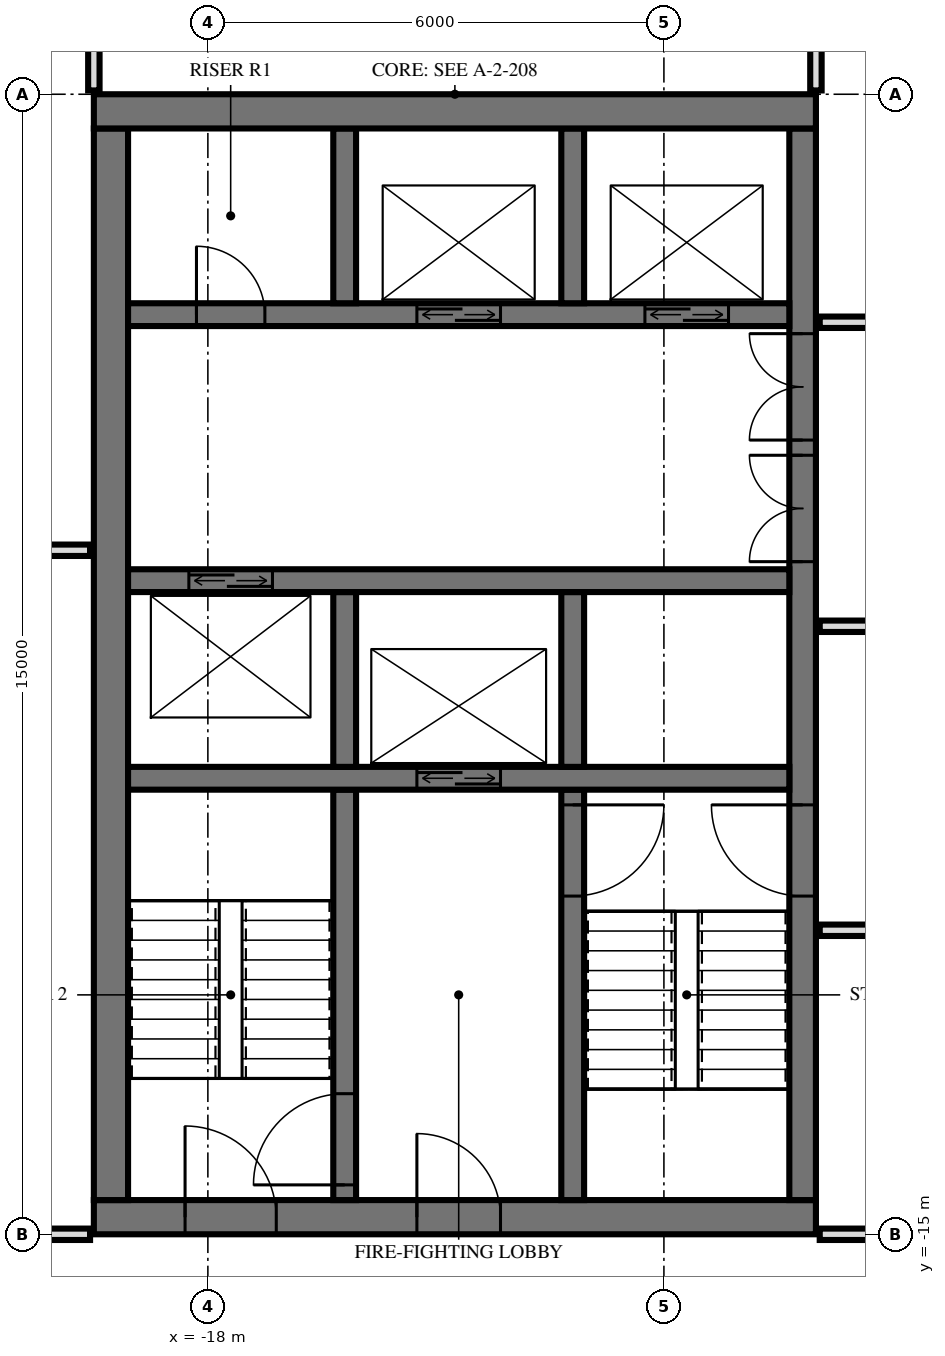
"""IFC4 building model, lengths in metres.
Left out: names, types, materials, properties, quantities, classifications, styles, units other than length and angle.
Written with IfcOpenShell. Run it as: python <this file> out.ifc"""

import sys

from ifc_helpers import new_model, si_unit, direction, frame, frame_2d, origin, place, context, subcontext, project, spatial, rectangle, extrude, element, fill, save


model = new_model("IFC4")
c1 = context("Model", 3, precision=1e-05, world=origin(), true_north=direction((0.0, 1.0)))
c2 = subcontext(c1, "Body", "Model", "MODEL_VIEW")
j1 = project(units=[si_unit("LENGTHUNIT", "METRE"), si_unit("PLANEANGLEUNIT", "RADIAN")], contexts=[c1])
p1 = place(None, origin())
s1 = spatial("IfcSite", under=j1, at=p1, CompositionType="ELEMENT")
p2 = place(p1, origin())
s2 = spatial("IfcBuilding", under=s1, at=p2, CompositionType="ELEMENT")
p3 = place(p2, frame((0.0, 0.0, 277.1)))
s3 = spatial("IfcBuildingStorey", under=s2, at=p3, CompositionType="ELEMENT", Elevation=277.1)
p4 = place(p3, frame((-19.5, -0.225, 0.0), z_axis=(0.0, 0.0, 1.0), x_axis=(1.0, 0.0, 0.0)))
e1 = element("IfcWall", 1, at=p4, inside=s3, PredefinedType="SHEAR", context=c2, shape_type="SweptSolid", body=[
    extrude(rectangle(XDim=9.5, YDim=0.45, at=frame_2d((4.75, 0.0))), origin(), (0.0, 0.0, 1.0), 3.5),
])
p5 = place(p3, frame((-19.5, -14.775, 0.0), z_axis=(0.0, 0.0, 1.0), x_axis=(1.0, 0.0, 0.0)))
e2 = element("IfcWall", 2, at=p5, inside=s3, PredefinedType="SHEAR", context=c2, shape_type="SweptSolid", body=[
    extrude(rectangle(XDim=9.5, YDim=0.45, at=frame_2d((4.75, 0.0))), origin(), (0.0, 0.0, 1.0), 3.5),
])
p6 = place(p5, frame((1.2, 0.0, 0.0)))
e3 = element("IfcOpeningElement", 3, at=p6, cuts=e2, PredefinedType="OPENING", context=c2, shape_type="SweptSolid", body=[
    extrude(rectangle(XDim=1.2, YDim=2.1, at=frame_2d((0.6, 1.05))), frame((0.0, 0.235, 0.0), z_axis=(0.0, -1.0, 0.0), x_axis=(1.0, 0.0, 0.0)), (0.0, 0.0, 1.0), 0.47),
])
p7 = place(p5, frame((4.25, 0.0, 0.0)))
e4 = element("IfcOpeningElement", 4, at=p7, cuts=e2, PredefinedType="OPENING", context=c2, shape_type="SweptSolid", body=[
    extrude(rectangle(XDim=1.1, YDim=2.1, at=frame_2d((0.55, 1.05))), frame((0.0, 0.235, 0.0), z_axis=(0.0, -1.0, 0.0), x_axis=(1.0, 0.0, 0.0)), (0.0, 0.0, 1.0), 0.47),
])
p8 = place(p3, frame((-10.175, -14.55, 0.0), z_axis=(0.0, 0.0, 1.0), x_axis=(0.0, 1.0, 0.0)))
e5 = element("IfcWall", 5, at=p8, inside=s3, PredefinedType="SHEAR", context=c2, shape_type="SweptSolid", body=[
    extrude(rectangle(XDim=14.1, YDim=0.35, at=frame_2d((7.05, 0.0))), origin(), (0.0, 0.0, 1.0), 3.5),
])
p9 = place(p8, frame((8.4, 0.0, 0.0)))
e6 = element("IfcOpeningElement", 6, at=p9, cuts=e5, PredefinedType="OPENING", context=c2, shape_type="SweptSolid", body=[
    extrude(rectangle(XDim=1.4, YDim=2.4, at=frame_2d((0.7, 1.2))), frame((0.0, 0.185, 0.0), z_axis=(0.0, -1.0, 0.0), x_axis=(1.0, 0.0, 0.0)), (0.0, 0.0, 1.0), 0.37),
])
p10 = place(p8, frame((10.0, 0.0, 0.0)))
e7 = element("IfcOpeningElement", 7, at=p10, cuts=e5, PredefinedType="OPENING", context=c2, shape_type="SweptSolid", body=[
    extrude(rectangle(XDim=1.4, YDim=2.4, at=frame_2d((0.7, 1.2))), frame((0.0, 0.185, 0.0), z_axis=(0.0, -1.0, 0.0), x_axis=(1.0, 0.0, 0.0)), (0.0, 0.0, 1.0), 0.37),
])
p11 = place(p8, frame((4.0, 0.0, 0.0)))
e8 = element("IfcOpeningElement", 8, at=p11, cuts=e5, PredefinedType="OPENING", context=c2, shape_type="SweptSolid", body=[
    extrude(rectangle(XDim=1.2, YDim=2.1, at=frame_2d((0.6, 1.05))), frame((0.0, 0.185, 0.0), z_axis=(0.0, -1.0, 0.0), x_axis=(1.0, 0.0, 0.0)), (0.0, 0.0, 1.0), 0.37),
])
p12 = place(p3, frame((-19.275, -14.55, 0.0), z_axis=(0.0, 0.0, 1.0), x_axis=(0.0, 1.0, 0.0)))
e9 = element("IfcWall", 9, at=p12, inside=s3, PredefinedType="SHEAR", context=c2, shape_type="SweptSolid", body=[
    extrude(rectangle(XDim=14.1, YDim=0.45, at=frame_2d((7.05, 0.0))), origin(), (0.0, 0.0, 1.0), 3.5),
])
p13 = place(p3, frame((-19.05, -2.9, 0.0), z_axis=(0.0, 0.0, 1.0), x_axis=(1.0, 0.0, 0.0)))
e10 = element("IfcWall", 10, at=p13, inside=s3, PredefinedType="SHEAR", context=c2, shape_type="SweptSolid", body=[
    extrude(rectangle(XDim=8.7, YDim=0.3, at=frame_2d((4.35, 0.0))), origin(), (0.0, 0.0, 1.0), 3.5),
])
p14 = place(p13, frame((6.8, 0.0, 0.0)))
e11 = element("IfcOpeningElement", 11, at=p14, cuts=e10, PredefinedType="OPENING", context=c2, shape_type="SweptSolid", body=[
    extrude(rectangle(XDim=1.1, YDim=2.1, at=frame_2d((0.55, 1.05))), frame((0.0, 0.16, 0.0), z_axis=(0.0, -1.0, 0.0), x_axis=(1.0, 0.0, 0.0)), (0.0, 0.0, 1.0), 0.32),
])
p15 = place(p13, frame((3.8, 0.0, 0.0)))
e12 = element("IfcOpeningElement", 12, at=p15, cuts=e10, PredefinedType="OPENING", context=c2, shape_type="SweptSolid", body=[
    extrude(rectangle(XDim=1.1, YDim=2.1, at=frame_2d((0.55, 1.05))), frame((0.0, 0.16, 0.0), z_axis=(0.0, -1.0, 0.0), x_axis=(1.0, 0.0, 0.0)), (0.0, 0.0, 1.0), 0.32),
])
p16 = place(p13, frame((0.9, 0.0, 0.0)))
e13 = element("IfcOpeningElement", 13, at=p16, cuts=e10, PredefinedType="OPENING", context=c2, shape_type="SweptSolid", body=[
    extrude(rectangle(XDim=0.9, YDim=2.1, at=frame_2d((0.45, 1.05))), frame((0.0, 0.16, 0.0), z_axis=(0.0, -1.0, 0.0), x_axis=(1.0, 0.0, 0.0)), (0.0, 0.0, 1.0), 0.32),
])
p17 = place(p3, frame((-19.05, -6.4, 0.0), z_axis=(0.0, 0.0, 1.0), x_axis=(1.0, 0.0, 0.0)))
e14 = element("IfcWall", 14, at=p17, inside=s3, PredefinedType="SHEAR", context=c2, shape_type="SweptSolid", body=[
    extrude(rectangle(XDim=8.7, YDim=0.3, at=frame_2d((4.35, 0.0))), origin(), (0.0, 0.0, 1.0), 3.5),
])
p18 = place(p17, frame((0.8, 0.0, 0.0)))
e15 = element("IfcOpeningElement", 15, at=p18, cuts=e14, PredefinedType="OPENING", context=c2, shape_type="SweptSolid", body=[
    extrude(rectangle(XDim=1.1, YDim=2.1, at=frame_2d((0.55, 1.05))), frame((0.0, 0.16, 0.0), z_axis=(0.0, -1.0, 0.0), x_axis=(1.0, 0.0, 0.0)), (0.0, 0.0, 1.0), 0.32),
])
p19 = place(p3, frame((-19.05, -9.0, 0.0), z_axis=(0.0, 0.0, 1.0), x_axis=(1.0, 0.0, 0.0)))
e16 = element("IfcWall", 16, at=p19, inside=s3, PredefinedType="SHEAR", context=c2, shape_type="SweptSolid", body=[
    extrude(rectangle(XDim=8.7, YDim=0.3, at=frame_2d((4.35, 0.0))), origin(), (0.0, 0.0, 1.0), 3.5),
])
p20 = place(p19, frame((3.8, 0.0, 0.0)))
e17 = element("IfcOpeningElement", 17, at=p20, cuts=e16, PredefinedType="OPENING", context=c2, shape_type="SweptSolid", body=[
    extrude(rectangle(XDim=1.1, YDim=2.1, at=frame_2d((0.55, 1.05))), frame((0.0, 0.16, 0.0), z_axis=(0.0, -1.0, 0.0), x_axis=(1.0, 0.0, 0.0)), (0.0, 0.0, 1.0), 0.32),
])
for number, where, z_axis, x_axis in (
    (18, (-13.2, -2.75, 0.0), (0.0, 0.0, 1.0), (0.0, 1.0, 0.0)),
    (19, (-13.2, -8.85, 0.0), (0.0, 0.0, 1.0), (0.0, 1.0, 0.0)),
):
    element("IfcWall", number, at=place(p3, frame(where, z_axis=z_axis, x_axis=x_axis)), inside=s3, PredefinedType="SHEAR", context=c2, shape_type="SweptSolid", body=[
        extrude(rectangle(XDim=2.3, YDim=0.3, at=frame_2d((1.15, 0.0))), origin(), (0.0, 0.0, 1.0), 3.5),
    ])
p21 = place(p3, frame((-13.2, -14.55, 0.0), z_axis=(0.0, 0.0, 1.0), x_axis=(0.0, 1.0, 0.0)))
e20 = element("IfcWall", 20, at=p21, inside=s3, PredefinedType="SHEAR", context=c2, shape_type="SweptSolid", body=[
    extrude(rectangle(XDim=5.4, YDim=0.3, at=frame_2d((2.7, 0.0))), origin(), (0.0, 0.0, 1.0), 3.5),
])
p22 = place(p21, frame((4.0, 0.0, 0.0)))
e21 = element("IfcOpeningElement", 21, at=p22, cuts=e20, PredefinedType="OPENING", context=c2, shape_type="SweptSolid", body=[
    extrude(rectangle(XDim=1.2, YDim=2.1, at=frame_2d((0.6, 1.05))), frame((0.0, 0.16, 0.0), z_axis=(0.0, -1.0, 0.0), x_axis=(1.0, 0.0, 0.0)), (0.0, 0.0, 1.0), 0.32),
])
for number, where, z_axis, x_axis in (
    (22, (-16.2, -2.75, 0.0), (0.0, 0.0, 1.0), (0.0, 1.0, 0.0)),
    (23, (-16.2, -8.85, 0.0), (0.0, 0.0, 1.0), (0.0, 1.0, 0.0)),
):
    element("IfcWall", number, at=place(p3, frame(where, z_axis=z_axis, x_axis=x_axis)), inside=s3, PredefinedType="SHEAR", context=c2, shape_type="SweptSolid", body=[
        extrude(rectangle(XDim=2.3, YDim=0.3, at=frame_2d((1.15, 0.0))), origin(), (0.0, 0.0, 1.0), 3.5),
    ])
p23 = place(p3, frame((-16.2, -14.55, 0.0), z_axis=(0.0, 0.0, 1.0), x_axis=(0.0, 1.0, 0.0)))
e24 = element("IfcWall", 24, at=p23, inside=s3, PredefinedType="SHEAR", context=c2, shape_type="SweptSolid", body=[
    extrude(rectangle(XDim=5.4, YDim=0.3, at=frame_2d((2.7, 0.0))), origin(), (0.0, 0.0, 1.0), 3.5),
])
p24 = place(p23, frame((0.2, 0.0, 0.0)))
e25 = element("IfcOpeningElement", 25, at=p24, cuts=e24, PredefinedType="OPENING", context=c2, shape_type="SweptSolid", body=[
    extrude(rectangle(XDim=1.2, YDim=2.1, at=frame_2d((0.6, 1.05))), frame((0.0, 0.16, 0.0), z_axis=(0.0, -1.0, 0.0), x_axis=(1.0, 0.0, 0.0)), (0.0, 0.0, 1.0), 0.32),
])
p25 = place(p3, frame((-10.0, 0.05, 0.0), z_axis=(0.0, 0.0, 1.0), x_axis=(0.0, 1.0, 0.0)))
e26 = element("IfcWall", 26, at=p25, inside=s3, PredefinedType="PARTITIONING", context=c2, shape_type="SweptSolid", body=[
    extrude(rectangle(XDim=0.97, YDim=0.15, at=frame_2d((0.485, 0.0))), origin(), (0.0, 0.0, 1.0), 3.22),
])
p26 = place(p3, frame((-19.5, 0.05, 0.0), z_axis=(0.0, 0.0, 1.0), x_axis=(0.0, 1.0, 0.0)))
e27 = element("IfcWall", 27, at=p26, inside=s3, PredefinedType="PARTITIONING", context=c2, shape_type="SweptSolid", body=[
    extrude(rectangle(XDim=0.787, YDim=0.15, at=frame_2d((0.394, 0.0))), origin(), (0.0, 0.0, 1.0), 3.22),
])
p27 = place(p3, frame((-22.92, -15.0, 0.0), z_axis=(0.0, 0.0, 1.0), x_axis=(1.0, 0.0, 0.0)))
e28 = element("IfcWall", 28, at=p27, inside=s3, PredefinedType="PARTITIONING", context=c2, shape_type="SweptSolid", body=[
    extrude(rectangle(XDim=3.37, YDim=0.15, at=frame_2d((1.685, 0.0))), origin(), (0.0, 0.0, 1.0), 3.22),
])
p28 = place(p27, frame((1.47, 0.0, 0.0)))
e29 = element("IfcOpeningElement", 29, at=p28, cuts=e28, PredefinedType="OPENING", context=c2, shape_type="SweptSolid", body=[
    extrude(rectangle(XDim=1.0, YDim=2.1, at=frame_2d((0.5, 1.05))), frame((0.0, 0.085, 0.0), z_axis=(0.0, -1.0, 0.0), x_axis=(1.0, 0.0, 0.0)), (0.0, 0.0, 1.0), 0.17),
])
p29 = place(p3, frame((-9.95, -15.0, 0.0), z_axis=(0.0, 0.0, 1.0), x_axis=(1.0, 0.0, 0.0)))
e30 = element("IfcWall", 30, at=p29, inside=s3, PredefinedType="PARTITIONING", context=c2, shape_type="SweptSolid", body=[
    extrude(rectangle(XDim=19.9, YDim=0.15, at=frame_2d((9.95, 0.0))), origin(), (0.0, 0.0, 1.0), 2.584),
])
p30 = place(p29, frame((9.45, 0.0, 0.0)))
e31 = element("IfcOpeningElement", 31, at=p30, cuts=e30, PredefinedType="OPENING", context=c2, shape_type="SweptSolid", body=[
    extrude(rectangle(XDim=1.0, YDim=2.1, at=frame_2d((0.5, 1.05))), frame((0.0, 0.085, 0.0), z_axis=(0.0, -1.0, 0.0), x_axis=(1.0, 0.0, 0.0)), (0.0, 0.0, 1.0), 0.17),
])
p31 = place(p3, frame((-9.95, -11.0, 0.0), z_axis=(0.0, 0.0, 1.0), x_axis=(1.0, 0.0, 0.0)))
e32 = element("IfcWall", 32, at=p31, inside=s3, PredefinedType="PARTITIONING", context=c2, shape_type="SweptSolid", body=[
    extrude(rectangle(XDim=19.9, YDim=0.15, at=frame_2d((9.95, 0.0))), origin(), (0.0, 0.0, 1.0), 3.22),
])
p32 = place(p31, frame((9.45, 0.0, 0.0)))
e33 = element("IfcOpeningElement", 33, at=p32, cuts=e32, PredefinedType="OPENING", context=c2, shape_type="SweptSolid", body=[
    extrude(rectangle(XDim=1.0, YDim=2.1, at=frame_2d((0.5, 1.05))), frame((0.0, 0.085, 0.0), z_axis=(0.0, -1.0, 0.0), x_axis=(1.0, 0.0, 0.0)), (0.0, 0.0, 1.0), 0.17),
])
p33 = place(p31, frame((15.45, 0.0, 0.0)))
e34 = element("IfcOpeningElement", 34, at=p33, cuts=e32, PredefinedType="OPENING", context=c2, shape_type="SweptSolid", body=[
    extrude(rectangle(XDim=1.0, YDim=2.1, at=frame_2d((0.5, 1.05))), frame((0.0, 0.085, 0.0), z_axis=(0.0, -1.0, 0.0), x_axis=(1.0, 0.0, 0.0)), (0.0, 0.0, 1.0), 0.17),
])
p34 = place(p3, frame((-9.95, -7.0, 0.0), z_axis=(0.0, 0.0, 1.0), x_axis=(1.0, 0.0, 0.0)))
e35 = element("IfcWall", 35, at=p34, inside=s3, PredefinedType="PARTITIONING", context=c2, shape_type="SweptSolid", body=[
    extrude(rectangle(XDim=19.9, YDim=0.15, at=frame_2d((9.95, 0.0))), origin(), (0.0, 0.0, 1.0), 3.22),
])
p35 = place(p34, frame((9.45, 0.0, 0.0)))
e36 = element("IfcOpeningElement", 36, at=p35, cuts=e35, PredefinedType="OPENING", context=c2, shape_type="SweptSolid", body=[
    extrude(rectangle(XDim=1.0, YDim=2.1, at=frame_2d((0.5, 1.05))), frame((0.0, 0.085, 0.0), z_axis=(0.0, -1.0, 0.0), x_axis=(1.0, 0.0, 0.0)), (0.0, 0.0, 1.0), 0.17),
])
p36 = place(p34, frame((3.45, 0.0, 0.0)))
e37 = element("IfcOpeningElement", 37, at=p36, cuts=e35, PredefinedType="OPENING", context=c2, shape_type="SweptSolid", body=[
    extrude(rectangle(XDim=1.0, YDim=2.1, at=frame_2d((0.5, 1.05))), frame((0.0, 0.085, 0.0), z_axis=(0.0, -1.0, 0.0), x_axis=(1.0, 0.0, 0.0)), (0.0, 0.0, 1.0), 0.17),
])
p37 = place(p3, frame((-22.92, -6.0, 0.0), z_axis=(0.0, 0.0, 1.0), x_axis=(1.0, 0.0, 0.0)))
e38 = element("IfcWall", 38, at=p37, inside=s3, PredefinedType="PARTITIONING", context=c2, shape_type="SweptSolid", body=[
    extrude(rectangle(XDim=3.37, YDim=0.15, at=frame_2d((1.685, 0.0))), origin(), (0.0, 0.0, 1.0), 3.22),
])
p38 = place(p37, frame((1.17, 0.0, 0.0)))
e39 = element("IfcOpeningElement", 39, at=p38, cuts=e38, PredefinedType="OPENING", context=c2, shape_type="SweptSolid", body=[
    extrude(rectangle(XDim=0.9, YDim=2.1, at=frame_2d((0.45, 1.05))), frame((0.0, 0.085, 0.0), z_axis=(0.0, -1.0, 0.0), x_axis=(1.0, 0.0, 0.0)), (0.0, 0.0, 1.0), 0.17),
])
p39 = place(p3, frame((-9.95, -3.0, 0.0), z_axis=(0.0, 0.0, 1.0), x_axis=(1.0, 0.0, 0.0)))
e40 = element("IfcWall", 40, at=p39, inside=s3, PredefinedType="PARTITIONING", context=c2, shape_type="SweptSolid", body=[
    extrude(rectangle(XDim=19.9, YDim=0.15, at=frame_2d((9.95, 0.0))), origin(), (0.0, 0.0, 1.0), 3.22),
])
p40 = place(p39, frame((4.2, 0.0, 0.0)))
e41 = element("IfcOpeningElement", 41, at=p40, cuts=e40, PredefinedType="OPENING", context=c2, shape_type="SweptSolid", body=[
    extrude(rectangle(XDim=1.0, YDim=2.1, at=frame_2d((0.5, 1.05))), frame((0.0, 0.085, 0.0), z_axis=(0.0, -1.0, 0.0), x_axis=(1.0, 0.0, 0.0)), (0.0, 0.0, 1.0), 0.17),
])
p41 = place(p39, frame((11.45, 0.0, 0.0)))
e42 = element("IfcOpeningElement", 42, at=p41, cuts=e40, PredefinedType="OPENING", context=c2, shape_type="SweptSolid", body=[
    extrude(rectangle(XDim=1.0, YDim=2.1, at=frame_2d((0.5, 1.05))), frame((0.0, 0.085, 0.0), z_axis=(0.0, -1.0, 0.0), x_axis=(1.0, 0.0, 0.0)), (0.0, 0.0, 1.0), 0.17),
])
p42 = place(p39, frame((15.45, 0.0, 0.0)))
e43 = element("IfcOpeningElement", 43, at=p42, cuts=e40, PredefinedType="OPENING", context=c2, shape_type="SweptSolid", body=[
    extrude(rectangle(XDim=1.0, YDim=2.1, at=frame_2d((0.5, 1.05))), frame((0.0, 0.085, 0.0), z_axis=(0.0, -1.0, 0.0), x_axis=(1.0, 0.0, 0.0)), (0.0, 0.0, 1.0), 0.17),
])
p43 = place(p39, frame((18.2, 0.0, 0.0)))
e44 = element("IfcOpeningElement", 44, at=p43, cuts=e40, PredefinedType="OPENING", context=c2, shape_type="SweptSolid", body=[
    extrude(rectangle(XDim=1.0, YDim=2.1, at=frame_2d((0.5, 1.05))), frame((0.0, 0.085, 0.0), z_axis=(0.0, -1.0, 0.0), x_axis=(1.0, 0.0, 0.0)), (0.0, 0.0, 1.0), 0.17),
])
p44 = place(p14, origin())
e45 = element("IfcDoor", 45, at=p44, inside=s3, OperationType="DOUBLE_DOOR_SLIDING", PredefinedType="USERDEFINED", context=c2, shape_type="SweptSolid", body=[
    extrude(rectangle(XDim=1.1, YDim=2.1, at=frame_2d((0.55, 1.05))), frame((0.0, 0.025, 0.0), z_axis=(0.0, -1.0, 0.0), x_axis=(1.0, 0.0, 0.0)), (0.0, 0.0, 1.0), 0.05),
])
fill(e11, e45)
p45 = place(p15, origin())
e46 = element("IfcDoor", 46, at=p45, inside=s3, OperationType="DOUBLE_DOOR_SLIDING", PredefinedType="USERDEFINED", context=c2, shape_type="SweptSolid", body=[
    extrude(rectangle(XDim=1.1, YDim=2.1, at=frame_2d((0.55, 1.05))), frame((0.0, 0.025, 0.0), z_axis=(0.0, -1.0, 0.0), x_axis=(1.0, 0.0, 0.0)), (0.0, 0.0, 1.0), 0.05),
])
fill(e12, e46)
p46 = place(p20, origin())
e47 = element("IfcDoor", 47, at=p46, inside=s3, OperationType="DOUBLE_DOOR_SLIDING", PredefinedType="USERDEFINED", context=c2, shape_type="SweptSolid", body=[
    extrude(rectangle(XDim=1.1, YDim=2.1, at=frame_2d((0.55, 1.05))), frame((0.0, 0.025, 0.0), z_axis=(0.0, -1.0, 0.0), x_axis=(1.0, 0.0, 0.0)), (0.0, 0.0, 1.0), 0.05),
])
fill(e17, e47)
p47 = place(p18, origin())
e48 = element("IfcDoor", 48, at=p47, inside=s3, OperationType="DOUBLE_DOOR_SLIDING", PredefinedType="USERDEFINED", context=c2, shape_type="SweptSolid", body=[
    extrude(rectangle(XDim=1.1, YDim=2.1, at=frame_2d((0.55, 1.05))), frame((0.0, 0.025, 0.0), z_axis=(0.0, -1.0, 0.0), x_axis=(1.0, 0.0, 0.0)), (0.0, 0.0, 1.0), 0.05),
])
fill(e15, e48)
p48 = place(p9, origin())
e49 = element("IfcDoor", 49, at=p48, inside=s3, OperationType="DOUBLE_DOOR_SINGLE_SWING", PredefinedType="DOOR", context=c2, shape_type="SweptSolid", body=[
    extrude(rectangle(XDim=1.4, YDim=2.4, at=frame_2d((0.7, 1.2))), frame((0.0, 0.025, 0.0), z_axis=(0.0, -1.0, 0.0), x_axis=(1.0, 0.0, 0.0)), (0.0, 0.0, 1.0), 0.05),
])
fill(e6, e49)
p49 = place(p10, origin())
e50 = element("IfcDoor", 50, at=p49, inside=s3, OperationType="DOUBLE_DOOR_SINGLE_SWING", PredefinedType="DOOR", context=c2, shape_type="SweptSolid", body=[
    extrude(rectangle(XDim=1.4, YDim=2.4, at=frame_2d((0.7, 1.2))), frame((0.0, 0.025, 0.0), z_axis=(0.0, -1.0, 0.0), x_axis=(1.0, 0.0, 0.0)), (0.0, 0.0, 1.0), 0.05),
])
fill(e7, e50)
p50 = place(p11, origin())
e51 = element("IfcDoor", 51, at=p50, inside=s3, OperationType="SINGLE_SWING_LEFT", PredefinedType="DOOR", context=c2, shape_type="SweptSolid", body=[
    extrude(rectangle(XDim=1.2, YDim=2.1, at=frame_2d((0.6, 1.05))), frame((0.0, 0.025, 0.0), z_axis=(0.0, -1.0, 0.0), x_axis=(1.0, 0.0, 0.0)), (0.0, 0.0, 1.0), 0.05),
])
fill(e8, e51)
p51 = place(p6, origin())
e52 = element("IfcDoor", 52, at=p51, inside=s3, OperationType="SINGLE_SWING_RIGHT", PredefinedType="DOOR", context=c2, shape_type="SweptSolid", body=[
    extrude(rectangle(XDim=1.2, YDim=2.1, at=frame_2d((0.6, 1.05))), frame((0.0, 0.025, 0.0), z_axis=(0.0, -1.0, 0.0), x_axis=(1.0, 0.0, 0.0)), (0.0, 0.0, 1.0), 0.05),
])
fill(e3, e52)
p52 = place(p7, origin())
e53 = element("IfcDoor", 53, at=p52, inside=s3, OperationType="SINGLE_SWING_RIGHT", PredefinedType="DOOR", context=c2, shape_type="SweptSolid", body=[
    extrude(rectangle(XDim=1.1, YDim=2.1, at=frame_2d((0.55, 1.05))), frame((0.0, 0.025, 0.0), z_axis=(0.0, -1.0, 0.0), x_axis=(1.0, 0.0, 0.0)), (0.0, 0.0, 1.0), 0.05),
])
fill(e4, e53)
p53 = place(p16, origin())
e54 = element("IfcDoor", 54, at=p53, inside=s3, OperationType="SINGLE_SWING_RIGHT", PredefinedType="DOOR", context=c2, shape_type="SweptSolid", body=[
    extrude(rectangle(XDim=0.9, YDim=2.1, at=frame_2d((0.45, 1.05))), frame((0.0, 0.025, 0.0), z_axis=(0.0, -1.0, 0.0), x_axis=(1.0, 0.0, 0.0)), (0.0, 0.0, 1.0), 0.05),
])
fill(e13, e54)
p54 = place(p22, frame((0.6, 0.0, 0.0), z_axis=(0.0, 0.0, 1.0), x_axis=(-1.0, 0.0, 0.0)))
e55 = element("IfcDoor", 55, at=p54, inside=s3, OperationType="SINGLE_SWING_RIGHT", PredefinedType="DOOR", context=c2, shape_type="SweptSolid", body=[
    extrude(rectangle(XDim=1.2, YDim=2.1, at=frame_2d((0.0, 1.05))), frame((0.0, -0.025, 0.0), z_axis=(0.0, 1.0, 0.0), x_axis=(-1.0, 0.0, 0.0)), (0.0, 0.0, 1.0), 0.05),
])
fill(e21, e55)
p55 = place(p24, origin())
e56 = element("IfcDoor", 56, at=p55, inside=s3, OperationType="SINGLE_SWING_RIGHT", PredefinedType="DOOR", context=c2, shape_type="SweptSolid", body=[
    extrude(rectangle(XDim=1.2, YDim=2.1, at=frame_2d((0.6, 1.05))), frame((0.0, 0.025, 0.0), z_axis=(0.0, -1.0, 0.0), x_axis=(1.0, 0.0, 0.0)), (0.0, 0.0, 1.0), 0.05),
])
fill(e25, e56)
save(model, sys.argv[1])
